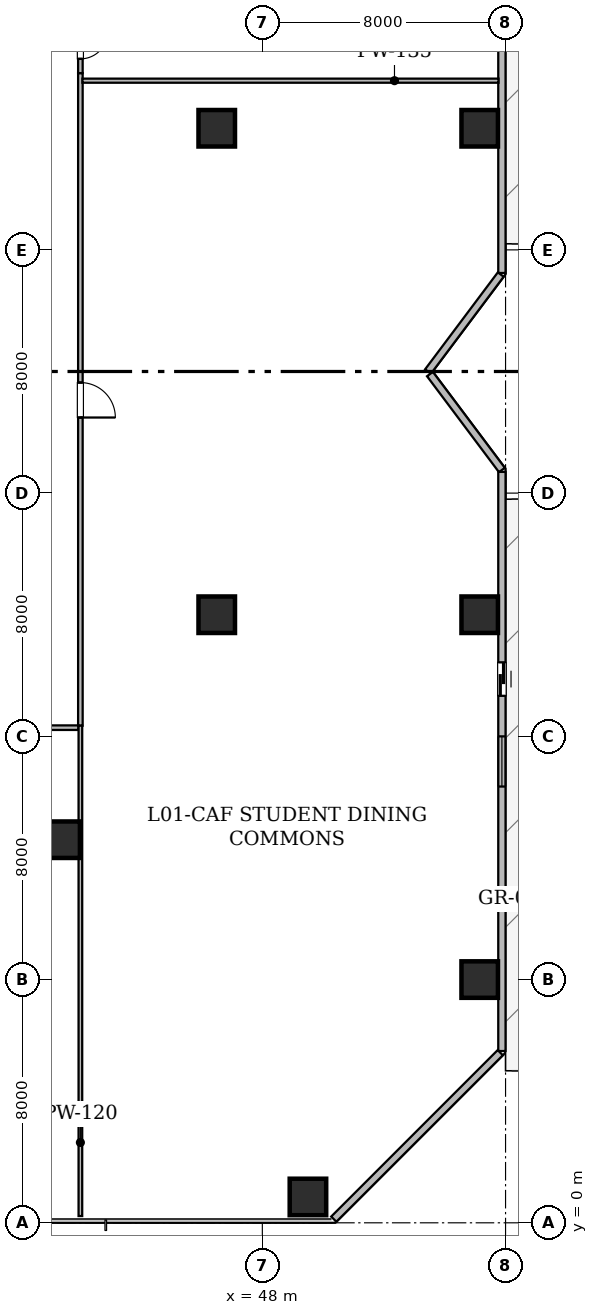
"""IFC4 building model, lengths in metres.
Left out: names, types, materials, properties, quantities, classifications, styles, units other than length and angle.
Written with IfcOpenShell. Run it as: python <this file> out.ifc"""

import sys

from ifc_helpers import new_model, si_unit, direction, frame, frame_2d, origin, origin_2d, place, context, subcontext, project, spatial, rectangle, hollow_rectangle, extrude, element, fill, save


model = new_model("IFC4")
c1 = context("Model", 3, precision=1e-05, world=origin(), true_north=direction((0.0, 1.0)))
c2 = subcontext(c1, "Body", "Model", "MODEL_VIEW")
j1 = project(units=[si_unit("LENGTHUNIT", "METRE"), si_unit("PLANEANGLEUNIT", "RADIAN")], contexts=[c1])
p1 = place(None, origin())
s1 = spatial("IfcSite", under=j1, at=p1, CompositionType="ELEMENT")
p2 = place(p1, origin())
s2 = spatial("IfcBuilding", under=s1, at=p2, CompositionType="ELEMENT")
p3 = place(p2, frame((0.0, 0.0, 7.2)))
s3 = spatial("IfcBuildingStorey", under=s2, at=p3, CompositionType="ELEMENT", Elevation=7.2)
for number, where, z_axis, x_axis in (
    (1, (49.5, 0.85, 0.0), (0.0, 0.0, 1.0), (1.0, 0.0, 0.0)),
    (2, (55.15, 8.0, 0.0), (0.0, 0.0, 1.0), (1.0, 0.0, 0.0)),
    (3, (55.15, 20.0, 0.0), (0.0, 0.0, 1.0), (1.0, 0.0, 0.0)),
    (4, (55.15, 36.0, 0.0), (0.0, 0.0, 1.0), (1.0, 0.0, 0.0)),
    (5, (41.4, 12.6, 0.0), (0.0, 0.0, 1.0), (1.0, 0.0, 0.0)),
    (6, (46.5, 20.0, 0.0), (0.0, 0.0, 1.0), (1.0, 0.0, 0.0)),
    (7, (46.5, 36.0, 0.0), (0.0, 0.0, 1.0), (1.0, 0.0, 0.0)),
):
    element("IfcColumn", number, at=place(p3, frame(where, z_axis=z_axis, x_axis=x_axis)), inside=s3, PredefinedType="COLUMN", context=c2, shape_type="SweptSolid", body=[
        extrude(hollow_rectangle(XDim=1.2, YDim=1.2, WallThickness=0.06, at=origin_2d()), origin(), (0.0, 0.0, 1.0), 4.8),
    ])
p4 = place(p3, frame((55.88, 50.272, 0.0), z_axis=(0.0, 0.0, 1.0), x_axis=(0.0, -1.0, 0.0)))
e8 = element("IfcWall", 8, at=p4, inside=s3, PredefinedType="STANDARD", context=c2, shape_type="SweptSolid", body=[
    extrude(rectangle(XDim=19.032, YDim=0.24, at=frame_2d((9.516, 0.0))), origin(), (0.0, 0.0, 1.0), 4.48),
])
p5 = place(p4, frame((4.778, 0.0, 0.0)))
e9 = element("IfcOpeningElement", 9, at=p5, cuts=e8, PredefinedType="OPENING", context=c2, shape_type="SweptSolid", body=[
    extrude(rectangle(XDim=1.1, YDim=2.2, at=frame_2d((0.55, 1.1))), frame((0.0, 0.13, 0.0), z_axis=(0.0, -1.0, 0.0), x_axis=(1.0, 0.0, 0.0)), (0.0, 0.0, 1.0), 0.26),
])
p6 = place(p3, frame((55.842, 31.189, 0.0), z_axis=(0.0, 0.0, 1.0), x_axis=(-0.600058791648, -0.799955902889, 0.0)))
e10 = element("IfcWall", 10, at=p6, inside=s3, PredefinedType="STANDARD", context=c2, shape_type="SweptSolid", body=[
    extrude(rectangle(XDim=3.986, YDim=0.24, at=frame_2d((1.993, 0.0))), origin(), (0.0, 0.0, 1.0), 4.48),
])
p7 = place(p3, frame((53.513, 27.916, 0.0), z_axis=(0.0, 0.0, 1.0), x_axis=(0.599990098106, -0.800007426325, 0.0)))
e11 = element("IfcWall", 11, at=p7, inside=s3, PredefinedType="STANDARD", context=c2, shape_type="SweptSolid", body=[
    extrude(rectangle(XDim=3.945, YDim=0.24, at=frame_2d((1.973, 0.0))), origin(), (0.0, 0.0, 1.0), 4.48),
])
p8 = place(p3, frame((55.88, 24.698, 0.0), z_axis=(0.0, 0.0, 1.0), x_axis=(0.0, -1.0, 0.0)))
e12 = element("IfcWall", 12, at=p8, inside=s3, PredefinedType="STANDARD", context=c2, shape_type="SweptSolid", body=[
    extrude(rectangle(XDim=19.048, YDim=0.24, at=frame_2d((9.524, 0.0))), origin(), (0.0, 0.0, 1.0), 4.48),
])
p9 = place(p8, frame((6.265, 0.0, 0.0)))
e13 = element("IfcOpeningElement", 13, at=p9, cuts=e12, PredefinedType="OPENING", context=c2, shape_type="SweptSolid", body=[
    extrude(rectangle(XDim=1.1, YDim=2.2, at=frame_2d((0.55, 1.1))), frame((0.0, 0.13, 0.0), z_axis=(0.0, -1.0, 0.0), x_axis=(1.0, 0.0, 0.0)), (0.0, 0.0, 1.0), 0.26),
])
p10 = place(p8, frame((8.699, 0.0, 0.85)))
e14 = element("IfcOpeningElement", 14, at=p10, cuts=e12, PredefinedType="OPENING", context=c2, shape_type="SweptSolid", body=[
    extrude(rectangle(XDim=1.65, YDim=1.55, at=frame_2d((0.825, 0.775))), frame((0.0, 0.13, 0.0), z_axis=(0.0, -1.0, 0.0), x_axis=(1.0, 0.0, 0.0)), (0.0, 0.0, 1.0), 0.26),
])
p11 = place(p3, frame((55.826, 5.596, 0.0), z_axis=(0.0, 0.0, 1.0), x_axis=(-0.707106781187, -0.707106781187, 0.0)))
e15 = element("IfcWall", 15, at=p11, inside=s3, PredefinedType="STANDARD", context=c2, shape_type="SweptSolid", body=[
    extrude(rectangle(XDim=7.744, YDim=0.24, at=frame_2d((3.872, 0.0))), origin(), (0.0, 0.0, 1.0), 4.48),
])
p12 = place(p3, frame((42.015, 37.814, 0.0), z_axis=(0.0, 0.0, 1.0), x_axis=(0.0, -1.0, 0.0)))
e16 = element("IfcWall", 16, at=p12, inside=s3, PredefinedType="STANDARD", context=c2, shape_type="SweptSolid", body=[
    extrude(rectangle(XDim=21.464, YDim=0.15, at=frame_2d((10.732, 0.0))), origin(), (0.0, 0.0, 1.0), 3.615),
])
p13 = place(p12, frame((10.178, 0.0, 0.0)))
e17 = element("IfcOpeningElement", 17, at=p13, cuts=e16, PredefinedType="OPENING", context=c2, shape_type="SweptSolid", body=[
    extrude(rectangle(XDim=1.15, YDim=2.2, at=frame_2d((0.575, 1.1))), frame((0.0, 0.085, 0.0), z_axis=(0.0, -1.0, 0.0), x_axis=(1.0, 0.0, 0.0)), (0.0, 0.0, 1.0), 0.17),
])
p14 = place(p3, frame((42.015, 39.65, 0.0), z_axis=(0.0, 0.0, 1.0), x_axis=(0.0, -1.0, 0.0)))
e18 = element("IfcWall", 18, at=p14, inside=s3, PredefinedType="STANDARD", context=c2, shape_type="SweptSolid", body=[
    extrude(rectangle(XDim=1.836, YDim=0.15, at=frame_2d((0.918, 0.0))), origin(), (0.0, 0.0, 1.0), 4.115),
])
p15 = place(p14, frame((0.468, 0.0, 0.0)))
e19 = element("IfcOpeningElement", 19, at=p15, cuts=e18, PredefinedType="OPENING", context=c2, shape_type="SweptSolid", body=[
    extrude(rectangle(XDim=0.9, YDim=2.1, at=frame_2d((0.45, 1.05))), frame((0.0, 0.085, 0.0), z_axis=(0.0, -1.0, 0.0), x_axis=(1.0, 0.0, 0.0)), (0.0, 0.0, 1.0), 0.17),
])
p16 = place(p3, frame((41.95, 16.285, 0.0), z_axis=(0.0, 0.0, 1.0), x_axis=(-1.0, 0.0, 0.0)))
e20 = element("IfcWall", 20, at=p16, inside=s3, PredefinedType="STANDARD", context=c2, shape_type="SweptSolid", body=[
    extrude(rectangle(XDim=8.206, YDim=0.15, at=frame_2d((4.103, 0.0))), origin(), (0.0, 0.0, 1.0), 3.615),
])
p17 = place(p16, frame((3.653, 0.0, 0.0)))
e21 = element("IfcOpeningElement", 21, at=p17, cuts=e20, PredefinedType="OPENING", context=c2, shape_type="SweptSolid", body=[
    extrude(rectangle(XDim=0.9, YDim=2.1, at=frame_2d((0.45, 1.05))), frame((0.0, 0.085, 0.0), z_axis=(0.0, -1.0, 0.0), x_axis=(1.0, 0.0, 0.0)), (0.0, 0.0, 1.0), 0.17),
])
p18 = place(p3, frame((42.082, 37.565, 0.0), z_axis=(0.0, 0.0, 1.0), x_axis=(1.0, 0.0, 0.0)))
e22 = element("IfcWall", 22, at=p18, inside=s3, PredefinedType="PARTITIONING", context=c2, shape_type="SweptSolid", body=[
    extrude(rectangle(XDim=13.686, YDim=0.135, at=frame_2d((6.843, 0.0))), origin(), (0.0, 0.0, 1.0), 3.615),
])
p19 = place(p3, frame((42.015, 0.222, 0.0), z_axis=(0.0, 0.0, 1.0), x_axis=(0.0, 1.0, 0.0)))
e23 = element("IfcWall", 23, at=p19, inside=s3, PredefinedType="PARTITIONING", context=c2, shape_type="SweptSolid", body=[
    extrude(rectangle(XDim=16.128, YDim=0.12, at=frame_2d((8.064, 0.0))), origin(), (0.0, 0.0, 1.0), 3.615),
])
p20 = place(p9, origin())
e24 = element("IfcDoor", 24, at=p20, inside=s3, OperationType="SLIDING_TO_LEFT", PredefinedType="DOOR", context=c2, shape_type="SweptSolid", body=[
    extrude(rectangle(XDim=1.1, YDim=2.2, at=frame_2d((0.55, 1.1))), frame((0.0, 0.025, 0.0), z_axis=(0.0, -1.0, 0.0), x_axis=(1.0, 0.0, 0.0)), (0.0, 0.0, 1.0), 0.05),
])
fill(e13, e24)
p21 = place(p10, origin())
e25 = element("IfcWindow", 25, at=p21, inside=s3, PartitioningType="SINGLE_PANEL", PredefinedType="WINDOW", context=c2, shape_type="SweptSolid", body=[
    extrude(rectangle(XDim=1.65, YDim=1.55, at=frame_2d((0.825, 0.775))), frame((0.0, 0.03, 0.0), z_axis=(0.0, -1.0, 0.0), x_axis=(1.0, 0.0, 0.0)), (0.0, 0.0, 1.0), 0.06),
])
fill(e14, e25)
p22 = place(p13, origin())
e26 = element("IfcDoor", 26, at=p22, inside=s3, OperationType="SINGLE_SWING_RIGHT", PredefinedType="DOOR", context=c2, shape_type="SweptSolid", body=[
    extrude(rectangle(XDim=1.15, YDim=2.2, at=frame_2d((0.575, 1.1))), frame((0.0, 0.025, 0.0), z_axis=(0.0, -1.0, 0.0), x_axis=(1.0, 0.0, 0.0)), (0.0, 0.0, 1.0), 0.05),
])
fill(e17, e26)
p23 = place(p15, origin())
e27 = element("IfcDoor", 27, at=p23, inside=s3, OperationType="SINGLE_SWING_LEFT", PredefinedType="DOOR", context=c2, shape_type="SweptSolid", body=[
    extrude(rectangle(XDim=0.9, YDim=2.1, at=frame_2d((0.45, 1.05))), frame((0.0, 0.025, 0.0), z_axis=(0.0, -1.0, 0.0), x_axis=(1.0, 0.0, 0.0)), (0.0, 0.0, 1.0), 0.05),
])
fill(e19, e27)
save(model, sys.argv[1])
